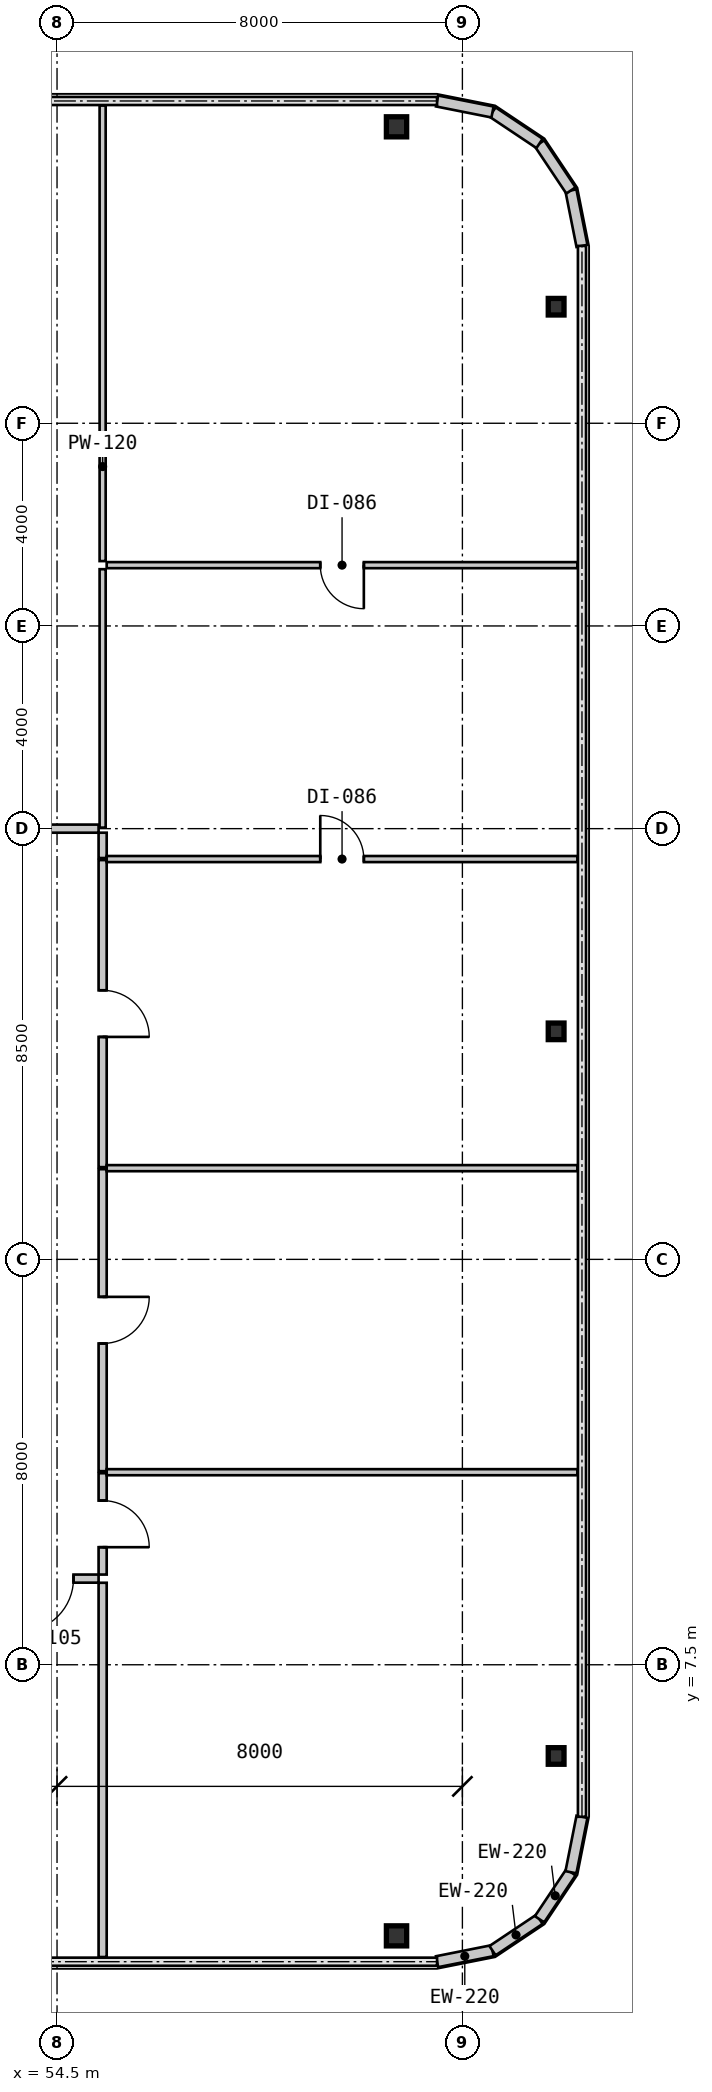
"""IFC4 building model, lengths in metres.
Left out: names, types, materials, properties, quantities, classifications, styles, units other than length and angle.
Written with IfcOpenShell. Run it as: python <this file> out.ifc"""

import sys

from ifc_helpers import new_model, si_unit, direction, frame, frame_2d, origin, origin_2d, place, context, subcontext, project, spatial, rectangle, i_section, extrude, source, transform, mapped, element, fill, save


model = new_model("IFC4")
c1 = context("Model", 3, precision=1e-05, world=origin(), true_north=direction((0.0, 1.0)))
c2 = subcontext(c1, "Body", "Model", "MODEL_VIEW")
j1 = project(units=[si_unit("LENGTHUNIT", "METRE"), si_unit("PLANEANGLEUNIT", "RADIAN")], contexts=[c1])
p1 = place(None, origin())
s1 = spatial("IfcSite", under=j1, at=p1, CompositionType="ELEMENT")
p2 = place(p1, origin())
s2 = spatial("IfcBuilding", under=s1, at=p2, CompositionType="ELEMENT")
p3 = place(p2, frame((0.0, 0.0, 26.25)))
s3 = spatial("IfcBuildingStorey", under=s2, at=p3, CompositionType="ELEMENT", Elevation=26.25)
m1 = source(origin(), c2, "Body", "SweptSolid", [
    extrude(i_section(OverallWidth=0.4, OverallDepth=0.396, WebThickness=0.022, FlangeThickness=0.034, at=origin_2d()), origin(), (0.0, 0.0, 1.0), 3.15),
])
for number, where, z_axis, x_axis in (
    (1, (61.2, 2.15, 0.0), (0.0, 0.0, 1.0), (1.0, 0.0, 0.0)),
    (2, (61.2, 37.85, 0.0), (0.0, 0.0, 1.0), (1.0, 0.0, 0.0)),
):
    element("IfcColumn", number, at=place(p3, frame(where, z_axis=z_axis, x_axis=x_axis)), inside=s3, PredefinedType="COLUMN", context=c2, shape_type="MappedRepresentation", body=[
        mapped(m1, transform((0.0, 0.0, 0.0), scale=1.0)),
    ])
m2 = source(origin(), c2, "Body", "SweptSolid", [
    extrude(i_section(OverallWidth=0.311, OverallDepth=0.327, WebThickness=0.016, FlangeThickness=0.025, at=origin_2d()), origin(), (0.0, 0.0, 1.0), 3.15),
])
for number, where, z_axis, x_axis in (
    (3, (64.35, 5.7, 0.0), (0.0, 0.0, 1.0), (1.0, 0.0, 0.0)),
    (4, (64.35, 20.0, 0.0), (0.0, 0.0, 1.0), (1.0, 0.0, 0.0)),
    (5, (64.35, 34.3, 0.0), (0.0, 0.0, 1.0), (1.0, 0.0, 0.0)),
):
    element("IfcColumn", number, at=place(p3, frame(where, z_axis=z_axis, x_axis=x_axis)), inside=s3, PredefinedType="COLUMN", context=c2, shape_type="MappedRepresentation", body=[
        mapped(m2, transform((0.0, 0.0, 0.0), scale=1.0)),
    ])
m3 = source(origin(), c2, "Body", "SweptSolid", [
    extrude(rectangle(XDim=1.116, YDim=0.22, at=frame_2d((0.558, 0.0))), origin(), (0.0, 0.0, 1.0), 2.93),
])
for number, where, z_axis, x_axis in (
    (6, (62.0, 1.64, 0.0), (0.0, 0.0, 1.0), (0.981, 0.195, 0.0)),
    (7, (63.094, 1.858, 0.0), (0.0, 0.0, 1.0), (0.831, 0.556, 0.0)),
    (8, (64.022, 2.478, 0.0), (0.0, 0.0, 1.0), (0.556, 0.831, 0.0)),
    (9, (64.642, 3.406, 0.0), (0.0, 0.0, 1.0), (0.195, 0.981, 0.0)),
    (10, (64.86, 35.5, 0.0), (0.0, 0.0, 1.0), (-0.195, 0.981, 0.0)),
    (11, (64.642, 36.594, 0.0), (0.0, 0.0, 1.0), (-0.556, 0.831, 0.0)),
    (12, (64.022, 37.522, 0.0), (0.0, 0.0, 1.0), (-0.831, 0.556, 0.0)),
    (13, (63.094, 38.142, 0.0), (0.0, 0.0, 1.0), (-0.981, 0.195, 0.0)),
):
    element("IfcWall", number, at=place(p3, frame(where, z_axis=z_axis, x_axis=x_axis)), inside=s3, PredefinedType="SOLIDWALL", context=c2, shape_type="MappedRepresentation", body=[
        mapped(m3, transform((0.0, 0.0, 0.0), scale=1.0)),
    ])
m4 = source(origin(), c2, "Body", "SweptSolid", [
    extrude(rectangle(XDim=2.04, YDim=0.16, at=frame_2d((1.02, 0.0))), origin(), (0.0, 0.0, 1.0), 2.93),
])
p4 = place(p3, frame((55.32, 9.2, 0.0), z_axis=(0.0, 0.0, 1.0), x_axis=(-1.0, 0.0, 0.0)))
e14 = element("IfcWall", 14, at=p4, inside=s3, PredefinedType="PARTITIONING", context=c2, shape_type="MappedRepresentation", body=[
    mapped(m4, transform((0.0, 0.0, 0.0), scale=1.0)),
])
m5 = source(origin(), c2, "Body", "SweptSolid", [
    extrude(rectangle(XDim=1.05, YDim=2.1, at=frame_2d((0.525, 1.05))), frame((0.0, 0.09, 0.0), z_axis=(0.0, -1.0, 0.0), x_axis=(1.0, 0.0, 0.0)), (0.0, 0.0, 1.0), 0.18),
])
p5 = place(p4, frame((0.495, 0.0, 0.0)))
e15 = element("IfcOpeningElement", 15, at=p5, cuts=e14, PredefinedType="OPENING", context=c2, shape_type="MappedRepresentation", body=[
    mapped(m5, transform((0.0, 0.0, 0.0), scale=1.0)),
])
m6 = source(origin(), c2, "Body", "SweptSolid", [
    extrude(rectangle(XDim=2.0, YDim=0.16, at=frame_2d((1.0, 0.0))), origin(), (0.0, 0.0, 1.0), 2.93),
])
p6 = place(p3, frame((55.4, 11.28, 0.0), z_axis=(0.0, 0.0, 1.0), x_axis=(0.0, -1.0, 0.0)))
e16 = element("IfcWall", 16, at=p6, inside=s3, PredefinedType="PARTITIONING", context=c2, shape_type="MappedRepresentation", body=[
    mapped(m6, transform((0.0, 0.0, 0.0), scale=1.0)),
])
m7 = source(origin(), c2, "Body", "SweptSolid", [
    extrude(rectangle(XDim=0.92, YDim=2.1, at=frame_2d((0.46, 1.05))), frame((0.0, 0.09, 0.0), z_axis=(0.0, -1.0, 0.0), x_axis=(1.0, 0.0, 0.0)), (0.0, 0.0, 1.0), 0.18),
])
p7 = place(p6, frame((0.54, 0.0, 0.0)))
e17 = element("IfcOpeningElement", 17, at=p7, cuts=e16, PredefinedType="OPENING", context=c2, shape_type="MappedRepresentation", body=[
    mapped(m7, transform((0.0, 0.0, 0.0), scale=1.0)),
])
m8 = source(origin(), c2, "Body", "SweptSolid", [
    extrude(rectangle(XDim=5.959, YDim=0.16, at=frame_2d((2.98, 0.0))), origin(), (0.0, 0.0, 1.0), 2.93),
])
p8 = place(p3, frame((55.4, 17.28, 0.0), z_axis=(0.0, 0.0, 1.0), x_axis=(0.0, -1.0, 0.0)))
e18 = element("IfcWall", 18, at=p8, inside=s3, PredefinedType="PARTITIONING", context=c2, shape_type="MappedRepresentation", body=[
    mapped(m8, transform((0.0, 0.0, 0.0), scale=1.0)),
])
p9 = place(p8, frame((2.52, 0.0, 0.0)))
e19 = element("IfcOpeningElement", 19, at=p9, cuts=e18, PredefinedType="OPENING", context=c2, shape_type="MappedRepresentation", body=[
    mapped(m7, transform((0.0, 0.0, 0.0), scale=1.0)),
])
m9 = source(origin(), c2, "Body", "SweptSolid", [
    extrude(rectangle(XDim=6.06, YDim=0.16, at=frame_2d((3.03, 0.0))), origin(), (0.0, 0.0, 1.0), 2.93),
])
p10 = place(p3, frame((55.4, 23.38, 0.0), z_axis=(0.0, 0.0, 1.0), x_axis=(0.0, -1.0, 0.0)))
e20 = element("IfcWall", 20, at=p10, inside=s3, PredefinedType="PARTITIONING", context=c2, shape_type="MappedRepresentation", body=[
    mapped(m9, transform((0.0, 0.0, 0.0), scale=1.0)),
])
p11 = place(p10, frame((2.57, 0.0, 0.0)))
e21 = element("IfcOpeningElement", 21, at=p11, cuts=e20, PredefinedType="OPENING", context=c2, shape_type="MappedRepresentation", body=[
    mapped(m7, transform((0.0, 0.0, 0.0), scale=1.0)),
])
m10 = source(origin(), c2, "Body", "SweptSolid", [
    extrude(rectangle(XDim=0.5, YDim=0.16, at=frame_2d((0.25, 0.0))), origin(), (0.0, 0.0, 1.0), 2.93),
])
p12 = place(p3, frame((55.4, 23.92, 0.0), z_axis=(0.0, 0.0, 1.0), x_axis=(0.0, -1.0, 0.0)))
e22 = element("IfcWall", 22, at=p12, inside=s3, PredefinedType="PARTITIONING", context=c2, shape_type="MappedRepresentation", body=[
    mapped(m10, transform((0.0, 0.0, 0.0), scale=1.0)),
])
m11 = source(origin(), c2, "Body", "SweptSolid", [
    extrude(rectangle(XDim=4.13, YDim=0.16, at=frame_2d((2.065, 0.0))), origin(), (0.0, 0.0, 1.0), 2.93),
])
p13 = place(p3, frame((51.19, 24.0, 0.0), z_axis=(0.0, 0.0, 1.0), x_axis=(1.0, 0.0, 0.0)))
e23 = element("IfcWall", 23, at=p13, inside=s3, PredefinedType="PARTITIONING", context=c2, shape_type="MappedRepresentation", body=[
    mapped(m11, transform((0.0, 0.0, 0.0), scale=1.0)),
])
m12 = source(origin(), c2, "Body", "SweptSolid", [
    extrude(rectangle(XDim=7.386, YDim=0.16, at=frame_2d((3.693, 0.0))), origin(), (0.0, 0.0, 1.0), 2.93),
])
p14 = place(p3, frame((55.4, 9.118, 0.0), z_axis=(0.0, 0.0, 1.0), x_axis=(0.0, -1.0, 0.0)))
e24 = element("IfcWall", 24, at=p14, inside=s3, PredefinedType="PARTITIONING", context=c2, shape_type="MappedRepresentation", body=[
    mapped(m12, transform((0.0, 0.0, 0.0), scale=1.0)),
])
m13 = source(origin(), c2, "Body", "SweptSolid", [
    extrude(rectangle(XDim=9.29, YDim=0.12, at=frame_2d((4.645, 0.0))), origin(), (0.0, 0.0, 1.0), 2.93),
])
for number, where, z_axis, x_axis in (
    (25, (55.48, 11.3, 0.0), (0.0, 0.0, 1.0), (1.0, 0.0, 0.0)),
    (26, (55.48, 17.3, 0.0), (0.0, 0.0, 1.0), (1.0, 0.0, 0.0)),
):
    element("IfcWall", number, at=place(p3, frame(where, z_axis=z_axis, x_axis=x_axis)), inside=s3, PredefinedType="PARTITIONING", context=c2, shape_type="MappedRepresentation", body=[
        mapped(m13, transform((0.0, 0.0, 0.0), scale=1.0)),
    ])
p15 = place(p3, frame((55.48, 23.4, 0.0), z_axis=(0.0, 0.0, 1.0), x_axis=(1.0, 0.0, 0.0)))
e27 = element("IfcWall", 27, at=p15, inside=s3, PredefinedType="PARTITIONING", context=c2, shape_type="MappedRepresentation", body=[
    mapped(m13, transform((0.0, 0.0, 0.0), scale=1.0)),
])
m14 = source(origin(), c2, "Body", "SweptSolid", [
    extrude(rectangle(XDim=0.86, YDim=2.1, at=frame_2d((0.43, 1.05))), frame((0.0, 0.07, 0.0), z_axis=(0.0, -1.0, 0.0), x_axis=(1.0, 0.0, 0.0)), (0.0, 0.0, 1.0), 0.14),
])
p16 = place(p15, frame((4.215, 0.0, 0.0)))
e28 = element("IfcOpeningElement", 28, at=p16, cuts=e27, PredefinedType="OPENING", context=c2, shape_type="MappedRepresentation", body=[
    mapped(m14, transform((0.0, 0.0, 0.0), scale=1.0)),
])
p17 = place(p3, frame((55.48, 29.2, 0.0), z_axis=(0.0, 0.0, 1.0), x_axis=(1.0, 0.0, 0.0)))
e29 = element("IfcWall", 29, at=p17, inside=s3, PredefinedType="PARTITIONING", context=c2, shape_type="MappedRepresentation", body=[
    mapped(m13, transform((0.0, 0.0, 0.0), scale=1.0)),
])
p18 = place(p17, frame((4.215, 0.0, 0.0)))
e30 = element("IfcOpeningElement", 30, at=p18, cuts=e29, PredefinedType="OPENING", context=c2, shape_type="MappedRepresentation", body=[
    mapped(m14, transform((0.0, 0.0, 0.0), scale=1.0)),
])
m15 = source(origin(), c2, "Body", "SweptSolid", [
    extrude(rectangle(XDim=5.1, YDim=0.12, at=frame_2d((2.55, 0.0))), origin(), (0.0, 0.0, 1.0), 2.93),
])
p19 = place(p3, frame((55.4, 24.02, 0.0), z_axis=(0.0, 0.0, 1.0), x_axis=(0.0, 1.0, 0.0)))
e31 = element("IfcWall", 31, at=p19, inside=s3, PredefinedType="PARTITIONING", context=c2, shape_type="MappedRepresentation", body=[
    mapped(m15, transform((0.0, 0.0, 0.0), scale=1.0)),
])
m16 = source(origin(), c2, "Body", "SweptSolid", [
    extrude(rectangle(XDim=8.99, YDim=0.12, at=frame_2d((4.495, 0.0))), origin(), (0.0, 0.0, 1.0), 2.93),
])
p20 = place(p3, frame((55.4, 29.28, 0.0), z_axis=(0.0, 0.0, 1.0), x_axis=(0.0, 1.0, 0.0)))
e32 = element("IfcWall", 32, at=p20, inside=s3, PredefinedType="PARTITIONING", context=c2, shape_type="MappedRepresentation", body=[
    mapped(m16, transform((0.0, 0.0, 0.0), scale=1.0)),
])
m17 = source(origin(), c2, "Body", "SweptSolid", [
    extrude(rectangle(XDim=1.05, YDim=2.1, at=frame_2d((0.525, 1.05))), frame((0.0, 0.025, 0.0), z_axis=(0.0, -1.0, 0.0), x_axis=(1.0, 0.0, 0.0)), (0.0, 0.0, 1.0), 0.05),
])
p21 = place(p5, origin())
e33 = element("IfcDoor", 33, at=p21, inside=s3, OperationType="SINGLE_SWING_RIGHT", PredefinedType="DOOR", context=c2, shape_type="MappedRepresentation", body=[
    mapped(m17, transform((0.0, 0.0, 0.0), scale=1.0)),
])
fill(e15, e33)
m18 = source(origin(), c2, "Body", "SweptSolid", [
    extrude(rectangle(XDim=0.92, YDim=2.1, at=frame_2d((0.46, 1.05))), frame((0.0, 0.025, 0.0), z_axis=(0.0, -1.0, 0.0), x_axis=(1.0, 0.0, 0.0)), (0.0, 0.0, 1.0), 0.05),
])
p22 = place(p7, origin())
e34 = element("IfcDoor", 34, at=p22, inside=s3, OperationType="SINGLE_SWING_RIGHT", PredefinedType="DOOR", context=c2, shape_type="MappedRepresentation", body=[
    mapped(m18, transform((0.0, 0.0, 0.0), scale=1.0)),
])
fill(e17, e34)
p23 = place(p9, origin())
e35 = element("IfcDoor", 35, at=p23, inside=s3, OperationType="SINGLE_SWING_LEFT", PredefinedType="DOOR", context=c2, shape_type="MappedRepresentation", body=[
    mapped(m18, transform((0.0, 0.0, 0.0), scale=1.0)),
])
fill(e19, e35)
p24 = place(p11, origin())
e36 = element("IfcDoor", 36, at=p24, inside=s3, OperationType="SINGLE_SWING_RIGHT", PredefinedType="DOOR", context=c2, shape_type="MappedRepresentation", body=[
    mapped(m18, transform((0.0, 0.0, 0.0), scale=1.0)),
])
fill(e21, e36)
m19 = source(origin(), c2, "Body", "SweptSolid", [
    extrude(rectangle(XDim=0.86, YDim=2.1, at=frame_2d((0.43, 1.05))), frame((0.0, 0.025, 0.0), z_axis=(0.0, -1.0, 0.0), x_axis=(1.0, 0.0, 0.0)), (0.0, 0.0, 1.0), 0.05),
])
p25 = place(p16, origin())
e37 = element("IfcDoor", 37, at=p25, inside=s3, OperationType="SINGLE_SWING_LEFT", PredefinedType="DOOR", context=c2, shape_type="MappedRepresentation", body=[
    mapped(m19, transform((0.0, 0.0, 0.0), scale=1.0)),
])
fill(e28, e37)
p26 = place(p18, frame((0.86, 0.0, 0.0), z_axis=(0.0, 0.0, 1.0), x_axis=(-1.0, 0.0, 0.0)))
e38 = element("IfcDoor", 38, at=p26, inside=s3, OperationType="SINGLE_SWING_LEFT", PredefinedType="DOOR", context=c2, shape_type="MappedRepresentation", body=[
    mapped(m19, transform((0.0, 0.0, 0.0), scale=1.0)),
])
fill(e30, e38)
save(model, sys.argv[1])
